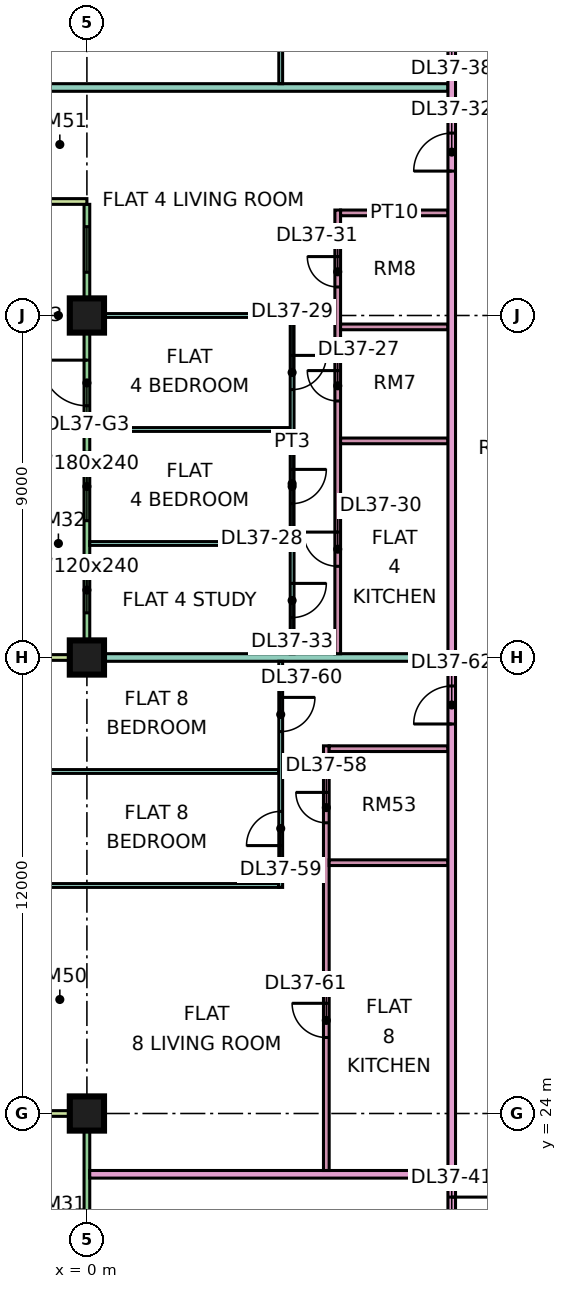
"""IFC4 building model, lengths in metres.
Left out: names, types, materials, properties, quantities, classifications, styles, units other than length and angle.
Written with IfcOpenShell. Run it as: python <this file> out.ifc"""

import sys

from ifc_helpers import new_model, si_unit, direction, frame, frame_2d, origin, origin_2d, place, context, subcontext, project, spatial, rectangle, extrude, element, fill, save


model = new_model("IFC4")
c1 = context("Model", 3, precision=1e-05, world=origin(), true_north=direction((0.0, 1.0)))
c2 = subcontext(c1, "Body", "Model", "MODEL_VIEW")
j1 = project(units=[si_unit("LENGTHUNIT", "METRE"), si_unit("PLANEANGLEUNIT", "RADIAN")], contexts=[c1])
p1 = place(None, origin())
s1 = spatial("IfcSite", under=j1, at=p1, CompositionType="ELEMENT")
p2 = place(p1, origin())
s2 = spatial("IfcBuilding", under=s1, at=p2, CompositionType="ELEMENT")
p3 = place(p2, frame((0.0, 0.0, 164.9)))
s3 = spatial("IfcBuildingStorey", under=s2, at=p3, CompositionType="ELEMENT", Elevation=164.9)
p4 = place(p3, frame((0.0, 24.0, 0.0), z_axis=(0.0, 0.0, 1.0), x_axis=(1.0, 0.0, 0.0)))
e1 = element("IfcColumn", 1, at=p4, inside=s3, PredefinedType="COLUMN", context=c2, shape_type="SweptSolid", body=[
    extrude(rectangle(XDim=0.9, YDim=0.9, at=origin_2d()), origin(), (0.0, 0.0, 1.0), 3.75),
])
p5 = place(p3, frame((0.0, 36.0, 0.0), z_axis=(0.0, 0.0, 1.0), x_axis=(1.0, 0.0, 0.0)))
e2 = element("IfcColumn", 2, at=p5, inside=s3, PredefinedType="COLUMN", context=c2, shape_type="SweptSolid", body=[
    extrude(rectangle(XDim=0.9, YDim=0.9, at=origin_2d()), origin(), (0.0, 0.0, 1.0), 3.75),
])
p6 = place(p3, frame((0.0, 45.0, 0.0), z_axis=(0.0, 0.0, 1.0), x_axis=(1.0, 0.0, 0.0)))
e3 = element("IfcColumn", 3, at=p6, inside=s3, PredefinedType="COLUMN", context=c2, shape_type="SweptSolid", body=[
    extrude(rectangle(XDim=0.9, YDim=0.9, at=origin_2d()), origin(), (0.0, 0.0, 1.0), 3.75),
])
p7 = place(p3, frame((0.0, 47.925, 0.0), z_axis=(0.0, 0.0, 1.0), x_axis=(0.0, -1.0, 0.0)))
e4 = element("IfcWall", 4, at=p7, inside=s3, PredefinedType="SOLIDWALL", context=c2, shape_type="SweptSolid", body=[
    extrude(rectangle(XDim=11.85, YDim=0.15, at=frame_2d((5.925, 0.0))), origin(), (0.0, 0.0, 1.0), 3.35),
])
p8 = place(p7, frame((0.587, 0.0, 0.45)))
e5 = element("IfcOpeningElement", 5, at=p8, cuts=e4, PredefinedType="OPENING", context=c2, shape_type="SweptSolid", body=[
    extrude(rectangle(XDim=1.2, YDim=2.4, at=frame_2d((0.6, 1.2))), frame((0.0, 0.085, 0.0), z_axis=(0.0, -1.0, 0.0), x_axis=(1.0, 0.0, 0.0)), (0.0, 0.0, 1.0), 0.17),
])
p9 = place(p7, frame((4.1, 0.0, 0.0)))
e6 = element("IfcOpeningElement", 6, at=p9, cuts=e4, PredefinedType="OPENING", context=c2, shape_type="SweptSolid", body=[
    extrude(rectangle(XDim=1.2, YDim=2.4, at=frame_2d((0.6, 1.2))), frame((0.0, 0.085, 0.0), z_axis=(0.0, -1.0, 0.0), x_axis=(1.0, 0.0, 0.0)), (0.0, 0.0, 1.0), 0.17),
])
p10 = place(p7, frame((6.525, 0.0, 0.45)))
e7 = element("IfcOpeningElement", 7, at=p10, cuts=e4, PredefinedType="OPENING", context=c2, shape_type="SweptSolid", body=[
    extrude(rectangle(XDim=1.8, YDim=2.4, at=frame_2d((0.9, 1.2))), frame((0.0, 0.085, 0.0), z_axis=(0.0, -1.0, 0.0), x_axis=(1.0, 0.0, 0.0)), (0.0, 0.0, 1.0), 0.17),
])
p11 = place(p7, frame((9.55, 0.0, 0.45)))
e8 = element("IfcOpeningElement", 8, at=p11, cuts=e4, PredefinedType="OPENING", context=c2, shape_type="SweptSolid", body=[
    extrude(rectangle(XDim=1.2, YDim=2.4, at=frame_2d((0.6, 1.2))), frame((0.0, 0.085, 0.0), z_axis=(0.0, -1.0, 0.0), x_axis=(1.0, 0.0, 0.0)), (0.0, 0.0, 1.0), 0.17),
])
for number, where, z_axis, x_axis in (
    (9, (-1.5, 48.0, 0.0), (0.0, 0.0, 1.0), (1.0, 0.0, 0.0)),
    (10, (-1.5, 36.0, 0.0), (0.0, 0.0, 1.0), (1.0, 0.0, 0.0)),
):
    element("IfcWall", number, at=place(p3, frame(where, z_axis=z_axis, x_axis=x_axis)), inside=s3, PredefinedType="SOLIDWALL", context=c2, shape_type="SweptSolid", body=[
        extrude(rectangle(XDim=1.5, YDim=0.15, at=frame_2d((0.75, 0.0))), origin(), (0.0, 0.0, 1.0), 3.35),
    ])
p12 = place(p3, frame((0.0, 23.925, 0.0), z_axis=(0.0, 0.0, 1.0), x_axis=(0.0, -1.0, 0.0)))
e11 = element("IfcWall", 11, at=p12, inside=s3, PredefinedType="SOLIDWALL", context=c2, shape_type="SweptSolid", body=[
    extrude(rectangle(XDim=11.35, YDim=0.15, at=frame_2d((5.675, 0.0))), origin(), (0.0, 0.0, 1.0), 3.35),
])
p13 = place(p12, frame((6.738, 0.0, 0.0)))
e12 = element("IfcOpeningElement", 12, at=p13, cuts=e11, PredefinedType="OPENING", context=c2, shape_type="SweptSolid", body=[
    extrude(rectangle(XDim=1.8, YDim=2.4, at=frame_2d((0.9, 1.2))), frame((0.0, 0.085, 0.0), z_axis=(0.0, -1.0, 0.0), x_axis=(1.0, 0.0, 0.0)), (0.0, 0.0, 1.0), 0.17),
])
p14 = place(p3, frame((-1.5, 24.0, 0.0), z_axis=(0.0, 0.0, 1.0), x_axis=(1.0, 0.0, 0.0)))
e13 = element("IfcWall", 13, at=p14, inside=s3, PredefinedType="SOLIDWALL", context=c2, shape_type="SweptSolid", body=[
    extrude(rectangle(XDim=1.5, YDim=0.15, at=frame_2d((0.75, 0.0))), origin(), (0.0, 0.0, 1.0), 3.35),
])
p15 = place(p3, frame((-1.351, 33.0, 0.0), z_axis=(0.0, 0.0, 1.0), x_axis=(1.0, 0.0, 0.0)))
e14 = element("IfcWall", 14, at=p15, inside=s3, PredefinedType="PARTITIONING", context=c2, shape_type="SweptSolid", body=[
    extrude(rectangle(XDim=6.401, YDim=0.1, at=frame_2d((3.201, 0.0))), origin(), (0.0, 0.0, 1.0), 3.35),
])
p16 = place(p3, frame((-1.35, 30.0, 0.0), z_axis=(0.0, 0.0, 1.0), x_axis=(1.0, 0.0, 0.0)))
e15 = element("IfcWall", 15, at=p16, inside=s3, PredefinedType="PARTITIONING", context=c2, shape_type="SweptSolid", body=[
    extrude(rectangle(XDim=6.4, YDim=0.1, at=frame_2d((3.2, 0.0))), origin(), (0.0, 0.0, 1.0), 3.35),
])
e16 = element("IfcWall", 16, at=p5, inside=s3, PredefinedType="PARTITIONING", context=c2, shape_type="SweptSolid", body=[
    extrude(rectangle(XDim=9.5, YDim=0.2, at=frame_2d((4.75, 0.0))), origin(), (0.0, 0.0, 1.0), 3.35),
])
p17 = place(p3, frame((-1.35, 51.0, 0.0), z_axis=(0.0, 0.0, 1.0), x_axis=(1.0, 0.0, 0.0)))
e17 = element("IfcWall", 17, at=p17, inside=s3, PredefinedType="PARTITIONING", context=c2, shape_type="SweptSolid", body=[
    extrude(rectangle(XDim=10.85, YDim=0.2, at=frame_2d((5.425, 0.0))), origin(), (0.0, 0.0, 1.0), 3.35),
])
p18 = place(p3, frame((0.074, 22.4, 0.0), z_axis=(0.0, 0.0, 1.0), x_axis=(1.0, 0.0, 0.0)))
e18 = element("IfcWall", 18, at=p18, inside=s3, PredefinedType="PARTITIONING", context=c2, shape_type="SweptSolid", body=[
    extrude(rectangle(XDim=9.426, YDim=0.2, at=frame_2d((4.713, 0.0))), origin(), (0.0, 0.0, 1.0), 3.35),
])
for number, where, z_axis, x_axis in (
    (19, (0.074, 39.0, 0.0), (0.0, 0.0, 1.0), (1.0, 0.0, 0.0)),
    (20, (0.074, 42.0, 0.0), (0.0, 0.0, 1.0), (1.0, 0.0, 0.0)),
    (21, (0.074, 45.0, 0.0), (0.0, 0.0, 1.0), (1.0, 0.0, 0.0)),
):
    element("IfcWall", number, at=place(p3, frame(where, z_axis=z_axis, x_axis=x_axis)), inside=s3, PredefinedType="PARTITIONING", context=c2, shape_type="SweptSolid", body=[
        extrude(rectangle(XDim=5.276, YDim=0.1, at=frame_2d((2.638, 0.0))), origin(), (0.0, 0.0, 1.0), 3.35),
    ])
p19 = place(p3, frame((5.1, 29.95, 0.0), z_axis=(0.0, 0.0, 1.0), x_axis=(0.0, 1.0, 0.0)))
e22 = element("IfcWall", 22, at=p19, inside=s3, PredefinedType="PARTITIONING", context=c2, shape_type="SweptSolid", body=[
    extrude(rectangle(XDim=5.95, YDim=0.1, at=frame_2d((2.975, 0.0))), origin(), (0.0, 0.0, 1.0), 3.35),
])
p20 = place(p19, frame((1.1, 0.0, 0.0)))
e23 = element("IfcOpeningElement", 23, at=p20, cuts=e22, PredefinedType="OPENING", context=c2, shape_type="SweptSolid", body=[
    extrude(rectangle(XDim=0.9, YDim=2.1, at=frame_2d((0.45, 1.05))), frame((0.0, 0.06, 0.0), z_axis=(0.0, -1.0, 0.0), x_axis=(1.0, 0.0, 0.0)), (0.0, 0.0, 1.0), 0.12),
])
p21 = place(p19, frame((4.1, 0.0, 0.0)))
e24 = element("IfcOpeningElement", 24, at=p21, cuts=e22, PredefinedType="OPENING", context=c2, shape_type="SweptSolid", body=[
    extrude(rectangle(XDim=0.9, YDim=2.1, at=frame_2d((0.45, 1.05))), frame((0.0, 0.06, 0.0), z_axis=(0.0, -1.0, 0.0), x_axis=(1.0, 0.0, 0.0)), (0.0, 0.0, 1.0), 0.12),
])
p22 = place(p3, frame((5.1, 51.1, 0.0), z_axis=(0.0, 0.0, 1.0), x_axis=(0.0, 1.0, 0.0)))
e25 = element("IfcWall", 25, at=p22, inside=s3, PredefinedType="PARTITIONING", context=c2, shape_type="SweptSolid", body=[
    extrude(rectangle(XDim=5.95, YDim=0.1, at=frame_2d((2.975, 0.0))), origin(), (0.0, 0.0, 1.0), 3.35),
])
p23 = place(p22, frame((0.95, 0.0, 0.0)))
e26 = element("IfcOpeningElement", 26, at=p23, cuts=e25, PredefinedType="OPENING", context=c2, shape_type="SweptSolid", body=[
    extrude(rectangle(XDim=0.9, YDim=2.1, at=frame_2d((0.45, 1.05))), frame((0.0, 0.06, 0.0), z_axis=(0.0, -1.0, 0.0), x_axis=(1.0, 0.0, 0.0)), (0.0, 0.0, 1.0), 0.12),
])
p24 = place(p22, frame((3.95, 0.0, 0.0)))
e27 = element("IfcOpeningElement", 27, at=p24, cuts=e25, PredefinedType="OPENING", context=c2, shape_type="SweptSolid", body=[
    extrude(rectangle(XDim=0.9, YDim=2.1, at=frame_2d((0.45, 1.05))), frame((0.0, 0.06, 0.0), z_axis=(0.0, -1.0, 0.0), x_axis=(1.0, 0.0, 0.0)), (0.0, 0.0, 1.0), 0.12),
])
p25 = place(p3, frame((5.4, 36.1, 0.0), z_axis=(0.0, 0.0, 1.0), x_axis=(0.0, 1.0, 0.0)))
e28 = element("IfcWall", 28, at=p25, inside=s3, PredefinedType="PARTITIONING", context=c2, shape_type="SweptSolid", body=[
    extrude(rectangle(XDim=8.95, YDim=0.1, at=frame_2d((4.475, 0.0))), origin(), (0.0, 0.0, 1.0), 3.35),
])
p26 = place(p25, frame((3.95, 0.0, 0.0)))
e29 = element("IfcOpeningElement", 29, at=p26, cuts=e28, PredefinedType="OPENING", context=c2, shape_type="SweptSolid", body=[
    extrude(rectangle(XDim=0.9, YDim=2.1, at=frame_2d((0.45, 1.05))), frame((0.0, 0.06, 0.0), z_axis=(0.0, -1.0, 0.0), x_axis=(1.0, 0.0, 0.0)), (0.0, 0.0, 1.0), 0.12),
])
p27 = place(p25, frame((6.95, 0.0, 0.0)))
e30 = element("IfcOpeningElement", 30, at=p27, cuts=e28, PredefinedType="OPENING", context=c2, shape_type="SweptSolid", body=[
    extrude(rectangle(XDim=0.9, YDim=2.1, at=frame_2d((0.45, 1.05))), frame((0.0, 0.06, 0.0), z_axis=(0.0, -1.0, 0.0), x_axis=(1.0, 0.0, 0.0)), (0.0, 0.0, 1.0), 0.12),
])
p28 = place(p25, frame((0.95, 0.0, 0.0)))
e31 = element("IfcOpeningElement", 31, at=p28, cuts=e28, PredefinedType="OPENING", context=c2, shape_type="SweptSolid", body=[
    extrude(rectangle(XDim=0.9, YDim=2.1, at=frame_2d((0.45, 1.05))), frame((0.0, 0.06, 0.0), z_axis=(0.0, -1.0, 0.0), x_axis=(1.0, 0.0, 0.0)), (0.0, 0.0, 1.0), 0.12),
])
p29 = place(p3, frame((6.3, 22.5, 0.0), z_axis=(0.0, 0.0, 1.0), x_axis=(0.0, 1.0, 0.0)))
e32 = element("IfcWall", 32, at=p29, inside=s3, PredefinedType="PARTITIONING", context=c2, shape_type="SweptSolid", body=[
    extrude(rectangle(XDim=11.175, YDim=0.15, at=frame_2d((5.587, 0.0))), origin(), (0.0, 0.0, 1.0), 3.35),
])
p30 = place(p29, frame((9.15, 0.0, 0.0)))
e33 = element("IfcOpeningElement", 33, at=p30, cuts=e32, PredefinedType="OPENING", context=c2, shape_type="SweptSolid", body=[
    extrude(rectangle(XDim=0.8, YDim=2.1, at=frame_2d((0.4, 1.05))), frame((0.0, 0.085, 0.0), z_axis=(0.0, -1.0, 0.0), x_axis=(1.0, 0.0, 0.0)), (0.0, 0.0, 1.0), 0.17),
])
p31 = place(p29, frame((3.5, 0.0, 0.0)))
e34 = element("IfcOpeningElement", 34, at=p31, cuts=e32, PredefinedType="OPENING", context=c2, shape_type="SweptSolid", body=[
    extrude(rectangle(XDim=0.9, YDim=2.1, at=frame_2d((0.45, 1.05))), frame((0.0, 0.085, 0.0), z_axis=(0.0, -1.0, 0.0), x_axis=(1.0, 0.0, 0.0)), (0.0, 0.0, 1.0), 0.17),
])
for number, where, z_axis, x_axis in (
    (35, (6.375, 30.6, 0.0), (0.0, 0.0, 1.0), (1.0, 0.0, 0.0)),
    (36, (6.375, 33.6, 0.0), (0.0, 0.0, 1.0), (1.0, 0.0, 0.0)),
):
    element("IfcWall", number, at=place(p3, frame(where, z_axis=z_axis, x_axis=x_axis)), inside=s3, PredefinedType="PARTITIONING", context=c2, shape_type="SweptSolid", body=[
        extrude(rectangle(XDim=3.125, YDim=0.15, at=frame_2d((1.562, 0.0))), origin(), (0.0, 0.0, 1.0), 3.35),
    ])
p32 = place(p3, frame((6.6, 36.1, 0.0), z_axis=(0.0, 0.0, 1.0), x_axis=(0.0, 1.0, 0.0)))
e37 = element("IfcWall", 37, at=p32, inside=s3, PredefinedType="PARTITIONING", context=c2, shape_type="SweptSolid", body=[
    extrude(rectangle(XDim=11.675, YDim=0.15, at=frame_2d((5.837, 0.0))), origin(), (0.0, 0.0, 1.0), 3.35),
])
p33 = place(p32, frame((6.65, 0.0, 0.0)))
e38 = element("IfcOpeningElement", 38, at=p33, cuts=e37, PredefinedType="OPENING", context=c2, shape_type="SweptSolid", body=[
    extrude(rectangle(XDim=0.8, YDim=2.1, at=frame_2d((0.4, 1.05))), frame((0.0, 0.085, 0.0), z_axis=(0.0, -1.0, 0.0), x_axis=(1.0, 0.0, 0.0)), (0.0, 0.0, 1.0), 0.17),
])
p34 = place(p32, frame((2.3, 0.0, 0.0)))
e39 = element("IfcOpeningElement", 39, at=p34, cuts=e37, PredefinedType="OPENING", context=c2, shape_type="SweptSolid", body=[
    extrude(rectangle(XDim=0.9, YDim=2.1, at=frame_2d((0.45, 1.05))), frame((0.0, 0.085, 0.0), z_axis=(0.0, -1.0, 0.0), x_axis=(1.0, 0.0, 0.0)), (0.0, 0.0, 1.0), 0.17),
])
p35 = place(p32, frame((9.65, 0.0, 0.0)))
e40 = element("IfcOpeningElement", 40, at=p35, cuts=e37, PredefinedType="OPENING", context=c2, shape_type="SweptSolid", body=[
    extrude(rectangle(XDim=0.8, YDim=2.1, at=frame_2d((0.4, 1.05))), frame((0.0, 0.085, 0.0), z_axis=(0.0, -1.0, 0.0), x_axis=(1.0, 0.0, 0.0)), (0.0, 0.0, 1.0), 0.17),
])
for number, where, z_axis, x_axis in (
    (41, (6.675, 41.7, 0.0), (0.0, 0.0, 1.0), (1.0, 0.0, 0.0)),
    (42, (6.675, 44.7, 0.0), (0.0, 0.0, 1.0), (1.0, 0.0, 0.0)),
    (43, (6.675, 47.7, 0.0), (0.0, 0.0, 1.0), (1.0, 0.0, 0.0)),
):
    element("IfcWall", number, at=place(p3, frame(where, z_axis=z_axis, x_axis=x_axis)), inside=s3, PredefinedType="PARTITIONING", context=c2, shape_type="SweptSolid", body=[
        extrude(rectangle(XDim=2.825, YDim=0.15, at=frame_2d((1.413, 0.0))), origin(), (0.0, 0.0, 1.0), 3.35),
    ])
p36 = place(p3, frame((9.6, 20.0, 0.0), z_axis=(0.0, 0.0, 1.0), x_axis=(0.0, 1.0, 0.0)))
e44 = element("IfcWall", 44, at=p36, inside=s3, PredefinedType="PARTITIONING", context=c2, shape_type="SweptSolid", body=[
    extrude(rectangle(XDim=44.35, YDim=0.2, at=frame_2d((22.175, 0.0))), origin(), (0.0, 0.0, 1.0), 3.35),
])
p37 = place(p36, frame((28.8, 0.0, 0.0)))
e45 = element("IfcOpeningElement", 45, at=p37, cuts=e44, PredefinedType="OPENING", context=c2, shape_type="SweptSolid", body=[
    extrude(rectangle(XDim=1.0, YDim=2.1, at=frame_2d((0.5, 1.05))), frame((0.0, 0.11, 0.0), z_axis=(0.0, -1.0, 0.0), x_axis=(1.0, 0.0, 0.0)), (0.0, 0.0, 1.0), 0.22),
])
p38 = place(p36, frame((32.1, 0.0, 0.0)))
e46 = element("IfcOpeningElement", 46, at=p38, cuts=e44, PredefinedType="OPENING", context=c2, shape_type="SweptSolid", body=[
    extrude(rectangle(XDim=1.0, YDim=2.1, at=frame_2d((0.5, 1.05))), frame((0.0, 0.11, 0.0), z_axis=(0.0, -1.0, 0.0), x_axis=(1.0, 0.0, 0.0)), (0.0, 0.0, 1.0), 0.22),
])
p39 = place(p36, frame((0.6, 0.0, 0.0)))
e47 = element("IfcOpeningElement", 47, at=p39, cuts=e44, PredefinedType="OPENING", context=c2, shape_type="SweptSolid", body=[
    extrude(rectangle(XDim=1.2, YDim=2.1, at=frame_2d((0.6, 1.05))), frame((0.0, 0.11, 0.0), z_axis=(0.0, -1.0, 0.0), x_axis=(1.0, 0.0, 0.0)), (0.0, 0.0, 1.0), 0.22),
])
p40 = place(p36, frame((14.25, 0.0, 0.0)))
e48 = element("IfcOpeningElement", 48, at=p40, cuts=e44, PredefinedType="OPENING", context=c2, shape_type="SweptSolid", body=[
    extrude(rectangle(XDim=1.0, YDim=2.1, at=frame_2d((0.5, 1.05))), frame((0.0, 0.11, 0.0), z_axis=(0.0, -1.0, 0.0), x_axis=(1.0, 0.0, 0.0)), (0.0, 0.0, 1.0), 0.22),
])
p41 = place(p8, origin())
e49 = element("IfcWindow", 49, at=p41, inside=s3, PartitioningType="SINGLE_PANEL", PredefinedType="WINDOW", context=c2, shape_type="SweptSolid", body=[
    extrude(rectangle(XDim=1.2, YDim=2.4, at=frame_2d((0.6, 1.2))), frame((0.0, 0.03, 0.0), z_axis=(0.0, -1.0, 0.0), x_axis=(1.0, 0.0, 0.0)), (0.0, 0.0, 1.0), 0.06),
])
fill(e5, e49)
p42 = place(p9, frame((1.2, 0.0, 0.0), z_axis=(0.0, 0.0, 1.0), x_axis=(-1.0, 0.0, 0.0)))
e50 = element("IfcDoor", 50, at=p42, inside=s3, OperationType="DOUBLE_DOOR_SINGLE_SWING", PredefinedType="DOOR", context=c2, shape_type="SweptSolid", body=[
    extrude(rectangle(XDim=1.2, YDim=2.4, at=frame_2d((0.6, 1.2))), frame((0.0, 0.025, 0.0), z_axis=(0.0, -1.0, 0.0), x_axis=(1.0, 0.0, 0.0)), (0.0, 0.0, 1.0), 0.05),
])
fill(e6, e50)
p43 = place(p10, origin())
e51 = element("IfcWindow", 51, at=p43, inside=s3, PartitioningType="SINGLE_PANEL", PredefinedType="WINDOW", context=c2, shape_type="SweptSolid", body=[
    extrude(rectangle(XDim=1.8, YDim=2.4, at=frame_2d((0.9, 1.2))), frame((0.0, 0.03, 0.0), z_axis=(0.0, -1.0, 0.0), x_axis=(1.0, 0.0, 0.0)), (0.0, 0.0, 1.0), 0.06),
])
fill(e7, e51)
p44 = place(p11, origin())
e52 = element("IfcWindow", 52, at=p44, inside=s3, PartitioningType="SINGLE_PANEL", PredefinedType="WINDOW", context=c2, shape_type="SweptSolid", body=[
    extrude(rectangle(XDim=1.2, YDim=2.4, at=frame_2d((0.6, 1.2))), frame((0.0, 0.03, 0.0), z_axis=(0.0, -1.0, 0.0), x_axis=(1.0, 0.0, 0.0)), (0.0, 0.0, 1.0), 0.06),
])
fill(e8, e52)
p45 = place(p33, frame((0.8, 0.0, 0.0), z_axis=(0.0, 0.0, 1.0), x_axis=(-1.0, 0.0, 0.0)))
e53 = element("IfcDoor", 53, at=p45, inside=s3, OperationType="SINGLE_SWING_RIGHT", PredefinedType="DOOR", context=c2, shape_type="SweptSolid", body=[
    extrude(rectangle(XDim=0.8, YDim=2.1, at=frame_2d((0.4, 1.05))), frame((0.0, 0.025, 0.0), z_axis=(0.0, -1.0, 0.0), x_axis=(1.0, 0.0, 0.0)), (0.0, 0.0, 1.0), 0.05),
])
fill(e38, e53)
p46 = place(p26, origin())
e54 = element("IfcDoor", 54, at=p46, inside=s3, OperationType="SINGLE_SWING_RIGHT", PredefinedType="DOOR", context=c2, shape_type="SweptSolid", body=[
    extrude(rectangle(XDim=0.9, YDim=2.1, at=frame_2d((0.45, 1.05))), frame((0.0, 0.025, 0.0), z_axis=(0.0, -1.0, 0.0), x_axis=(1.0, 0.0, 0.0)), (0.0, 0.0, 1.0), 0.05),
])
fill(e29, e54)
p47 = place(p27, origin())
e55 = element("IfcDoor", 55, at=p47, inside=s3, OperationType="SINGLE_SWING_RIGHT", PredefinedType="DOOR", context=c2, shape_type="SweptSolid", body=[
    extrude(rectangle(XDim=0.9, YDim=2.1, at=frame_2d((0.45, 1.05))), frame((0.0, 0.025, 0.0), z_axis=(0.0, -1.0, 0.0), x_axis=(1.0, 0.0, 0.0)), (0.0, 0.0, 1.0), 0.05),
])
fill(e30, e55)
p48 = place(p34, frame((0.9, 0.0, 0.0), z_axis=(0.0, 0.0, 1.0), x_axis=(-1.0, 0.0, 0.0)))
e56 = element("IfcDoor", 56, at=p48, inside=s3, OperationType="SINGLE_SWING_RIGHT", PredefinedType="DOOR", context=c2, shape_type="SweptSolid", body=[
    extrude(rectangle(XDim=0.9, YDim=2.1, at=frame_2d((0.45, 1.05))), frame((0.0, 0.025, 0.0), z_axis=(0.0, -1.0, 0.0), x_axis=(1.0, 0.0, 0.0)), (0.0, 0.0, 1.0), 0.05),
])
fill(e39, e56)
p49 = place(p35, frame((0.8, 0.0, 0.0), z_axis=(0.0, 0.0, 1.0), x_axis=(-1.0, 0.0, 0.0)))
e57 = element("IfcDoor", 57, at=p49, inside=s3, OperationType="SINGLE_SWING_RIGHT", PredefinedType="DOOR", context=c2, shape_type="SweptSolid", body=[
    extrude(rectangle(XDim=0.8, YDim=2.1, at=frame_2d((0.4, 1.05))), frame((0.0, 0.025, 0.0), z_axis=(0.0, -1.0, 0.0), x_axis=(1.0, 0.0, 0.0)), (0.0, 0.0, 1.0), 0.05),
])
fill(e40, e57)
p50 = place(p37, origin())
e58 = element("IfcDoor", 58, at=p50, inside=s3, OperationType="SINGLE_SWING_LEFT", PredefinedType="DOOR", context=c2, shape_type="SweptSolid", body=[
    extrude(rectangle(XDim=1.0, YDim=2.1, at=frame_2d((0.5, 1.05))), frame((0.0, 0.025, 0.0), z_axis=(0.0, -1.0, 0.0), x_axis=(1.0, 0.0, 0.0)), (0.0, 0.0, 1.0), 0.05),
])
fill(e45, e58)
p51 = place(p28, origin())
e59 = element("IfcDoor", 59, at=p51, inside=s3, OperationType="SINGLE_SWING_RIGHT", PredefinedType="DOOR", context=c2, shape_type="SweptSolid", body=[
    extrude(rectangle(XDim=0.9, YDim=2.1, at=frame_2d((0.45, 1.05))), frame((0.0, 0.025, 0.0), z_axis=(0.0, -1.0, 0.0), x_axis=(1.0, 0.0, 0.0)), (0.0, 0.0, 1.0), 0.05),
])
fill(e31, e59)
p52 = place(p39, origin())
e60 = element("IfcDoor", 60, at=p52, inside=s3, OperationType="SINGLE_SWING_RIGHT", PredefinedType="DOOR", context=c2, shape_type="SweptSolid", body=[
    extrude(rectangle(XDim=1.2, YDim=2.1, at=frame_2d((0.6, 1.05))), frame((0.0, 0.025, 0.0), z_axis=(0.0, -1.0, 0.0), x_axis=(1.0, 0.0, 0.0)), (0.0, 0.0, 1.0), 0.05),
])
fill(e47, e60)
p53 = place(p30, frame((0.8, 0.0, 0.0), z_axis=(0.0, 0.0, 1.0), x_axis=(-1.0, 0.0, 0.0)))
e61 = element("IfcDoor", 61, at=p53, inside=s3, OperationType="SINGLE_SWING_RIGHT", PredefinedType="DOOR", context=c2, shape_type="SweptSolid", body=[
    extrude(rectangle(XDim=0.8, YDim=2.1, at=frame_2d((0.4, 1.05))), frame((0.0, 0.025, 0.0), z_axis=(0.0, -1.0, 0.0), x_axis=(1.0, 0.0, 0.0)), (0.0, 0.0, 1.0), 0.05),
])
fill(e33, e61)
p54 = place(p20, origin())
e62 = element("IfcDoor", 62, at=p54, inside=s3, OperationType="SINGLE_SWING_LEFT", PredefinedType="DOOR", context=c2, shape_type="SweptSolid", body=[
    extrude(rectangle(XDim=0.9, YDim=2.1, at=frame_2d((0.45, 1.05))), frame((0.0, 0.025, 0.0), z_axis=(0.0, -1.0, 0.0), x_axis=(1.0, 0.0, 0.0)), (0.0, 0.0, 1.0), 0.05),
])
fill(e23, e62)
p55 = place(p21, origin())
e63 = element("IfcDoor", 63, at=p55, inside=s3, OperationType="SINGLE_SWING_RIGHT", PredefinedType="DOOR", context=c2, shape_type="SweptSolid", body=[
    extrude(rectangle(XDim=0.9, YDim=2.1, at=frame_2d((0.45, 1.05))), frame((0.0, 0.025, 0.0), z_axis=(0.0, -1.0, 0.0), x_axis=(1.0, 0.0, 0.0)), (0.0, 0.0, 1.0), 0.05),
])
fill(e24, e63)
p56 = place(p31, frame((0.9, 0.0, 0.0), z_axis=(0.0, 0.0, 1.0), x_axis=(-1.0, 0.0, 0.0)))
e64 = element("IfcDoor", 64, at=p56, inside=s3, OperationType="SINGLE_SWING_RIGHT", PredefinedType="DOOR", context=c2, shape_type="SweptSolid", body=[
    extrude(rectangle(XDim=0.9, YDim=2.1, at=frame_2d((0.45, 1.05))), frame((0.0, 0.025, 0.0), z_axis=(0.0, -1.0, 0.0), x_axis=(1.0, 0.0, 0.0)), (0.0, 0.0, 1.0), 0.05),
])
fill(e34, e64)
p57 = place(p40, origin())
e65 = element("IfcDoor", 65, at=p57, inside=s3, OperationType="SINGLE_SWING_LEFT", PredefinedType="DOOR", context=c2, shape_type="SweptSolid", body=[
    extrude(rectangle(XDim=1.0, YDim=2.1, at=frame_2d((0.5, 1.05))), frame((0.0, 0.025, 0.0), z_axis=(0.0, -1.0, 0.0), x_axis=(1.0, 0.0, 0.0)), (0.0, 0.0, 1.0), 0.05),
])
fill(e48, e65)
save(model, sys.argv[1])
